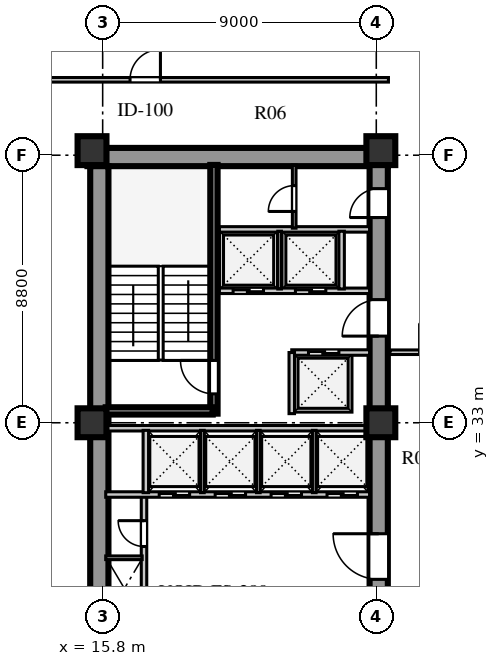
"""IFC4 building model, lengths in metres.
Left out: names, types, materials, properties, quantities, classifications, styles, units other than length and angle.
Written with IfcOpenShell. Run it as: python <this file> out.ifc"""

import sys

from ifc_helpers import new_model, si_unit, direction, frame, frame_2d, origin, origin_2d, place, context, subcontext, project, spatial, rectangle, extrude, element, fill, save


model = new_model("IFC4")
c1 = context("Model", 3, precision=1e-05, world=origin(), true_north=direction((0.0, 1.0)))
c2 = subcontext(c1, "Body", "Model", "MODEL_VIEW")
j1 = project(units=[si_unit("LENGTHUNIT", "METRE"), si_unit("PLANEANGLEUNIT", "RADIAN")], contexts=[c1])
p1 = place(None, origin())
s1 = spatial("IfcSite", under=j1, at=p1, CompositionType="ELEMENT")
p2 = place(p1, origin())
s2 = spatial("IfcBuilding", under=s1, at=p2, CompositionType="ELEMENT")
p3 = place(p2, frame((0.0, 0.0, 58.0)))
s3 = spatial("IfcBuildingStorey", under=s2, at=p3, CompositionType="ELEMENT", Elevation=58.0)
p4 = place(p3, frame((15.3, 41.74, 0.0), z_axis=(0.0, 0.0, 1.0), x_axis=(1.0, 0.0, 0.0)))
e1 = element("IfcWall", 1, at=p4, inside=s3, PredefinedType="SHEAR", context=c2, shape_type="SweptSolid", body=[
    extrude(rectangle(XDim=9.88, YDim=0.6, at=frame_2d((4.94, 0.0))), origin(), (0.0, 0.0, 1.0), 3.72),
])
p5 = place(p3, frame((15.69, 15.81, 0.0), z_axis=(0.0, 0.0, 1.0), x_axis=(0.0, 1.0, 0.0)))
e2 = element("IfcWall", 2, at=p5, inside=s3, PredefinedType="SHEAR", context=c2, shape_type="SweptSolid", body=[
    extrude(rectangle(XDim=25.63, YDim=0.6, at=frame_2d((12.815, 0.0))), origin(), (0.0, 0.0, 1.0), 3.72),
])
p6 = place(p3, frame((24.88, 15.74, 0.0), z_axis=(0.0, 0.0, 1.0), x_axis=(0.0, 1.0, 0.0)))
e3 = element("IfcWall", 3, at=p6, inside=s3, PredefinedType="SHEAR", context=c2, shape_type="SweptSolid", body=[
    extrude(rectangle(XDim=25.76, YDim=0.6, at=frame_2d((12.88, 0.0))), origin(), (0.0, 0.0, 1.0), 3.72),
])
p7 = place(p6, frame((1.61, 0.0, 0.0)))
e4 = element("IfcOpeningElement", 4, at=p7, cuts=e3, PredefinedType="OPENING", context=c2, shape_type="SweptSolid", body=[
    extrude(rectangle(XDim=1.2, YDim=2.1, at=frame_2d((0.6, 1.05))), frame((0.0, 0.31, 0.0), z_axis=(0.0, -1.0, 0.0), x_axis=(1.0, 0.0, 0.0)), (0.0, 0.0, 1.0), 0.62),
])
p8 = place(p6, frame((6.78, 0.0, 0.0)))
e5 = element("IfcOpeningElement", 5, at=p8, cuts=e3, PredefinedType="OPENING", context=c2, shape_type="SweptSolid", body=[
    extrude(rectangle(XDim=0.85, YDim=2.06, at=frame_2d((0.425, 1.03))), frame((0.0, 0.31, 0.0), z_axis=(0.0, -1.0, 0.0), x_axis=(1.0, 0.0, 0.0)), (0.0, 0.0, 1.0), 0.62),
])
p9 = place(p6, frame((12.11, 0.0, 0.0)))
e6 = element("IfcOpeningElement", 6, at=p9, cuts=e3, PredefinedType="OPENING", context=c2, shape_type="SweptSolid", body=[
    extrude(rectangle(XDim=1.5, YDim=2.12, at=frame_2d((0.75, 1.06))), frame((0.0, 0.31, 0.0), z_axis=(0.0, -1.0, 0.0), x_axis=(1.0, 0.0, 0.0)), (0.0, 0.0, 1.0), 0.62),
])
p10 = place(p6, frame((20.11, 0.0, 0.0)))
e7 = element("IfcOpeningElement", 7, at=p10, cuts=e3, PredefinedType="OPENING", context=c2, shape_type="SweptSolid", body=[
    extrude(rectangle(XDim=1.2, YDim=2.12, at=frame_2d((0.6, 1.06))), frame((0.0, 0.31, 0.0), z_axis=(0.0, -1.0, 0.0), x_axis=(1.0, 0.0, 0.0)), (0.0, 0.0, 1.0), 0.62),
])
p11 = place(p6, frame((24.01, 0.0, 0.0)))
e8 = element("IfcOpeningElement", 8, at=p11, cuts=e3, PredefinedType="OPENING", context=c2, shape_type="SweptSolid", body=[
    extrude(rectangle(XDim=0.95, YDim=2.1, at=frame_2d((0.475, 1.05))), frame((0.0, 0.31, 0.0), z_axis=(0.0, -1.0, 0.0), x_axis=(1.0, 0.0, 0.0)), (0.0, 0.0, 1.0), 0.62),
])
for number, where, z_axis, x_axis in (
    (9, (15.45, 33.0, 0.0), (0.0, 0.0, 1.0), (1.0, 0.0, 0.0)),
    (10, (15.45, 41.95, 0.0), (0.0, 0.0, 1.0), (1.0, 0.0, 0.0)),
    (11, (24.95, 33.0, 0.0), (0.0, 0.0, 1.0), (1.0, 0.0, 0.0)),
    (12, (24.95, 41.95, 0.0), (0.0, 0.0, 1.0), (1.0, 0.0, 0.0)),
):
    element("IfcColumn", number, at=place(p3, frame(where, z_axis=z_axis, x_axis=x_axis)), inside=s3, PredefinedType="COLUMN", context=c2, shape_type="SweptSolid", body=[
        extrude(rectangle(XDim=0.95, YDim=0.95, at=origin_2d()), origin(), (0.0, 0.0, 1.0), 3.72),
    ])
p12 = place(p3, frame((17.16, 26.58, 0.0), z_axis=(0.0, 0.0, 1.0), x_axis=(0.0, 1.0, 0.0)))
e13 = element("IfcWall", 13, at=p12, inside=s3, PredefinedType="SOLIDWALL", context=c2, shape_type="SweptSolid", body=[
    extrude(rectangle(XDim=4.02, YDim=0.18, at=frame_2d((2.01, 0.0))), origin(), (0.0, 0.0, 1.0), 3.72),
])
p13 = place(p12, frame((2.35, 0.0, 0.0)))
e14 = element("IfcOpeningElement", 14, at=p13, cuts=e13, PredefinedType="OPENING", context=c2, shape_type="SweptSolid", body=[
    extrude(rectangle(XDim=0.85, YDim=2.06, at=frame_2d((0.425, 1.03))), frame((0.0, 0.1, 0.0), z_axis=(0.0, -1.0, 0.0), x_axis=(1.0, 0.0, 0.0)), (0.0, 0.0, 1.0), 0.2),
])
p14 = place(p3, frame((15.9, 28.56, 0.0), z_axis=(0.0, 0.0, 1.0), x_axis=(1.0, 0.0, 0.0)))
e15 = element("IfcWall", 15, at=p14, inside=s3, PredefinedType="PARTITIONING", context=c2, shape_type="SweptSolid", body=[
    extrude(rectangle(XDim=1.2, YDim=0.12, at=frame_2d((0.6, 0.0))), origin(), (0.0, 0.0, 1.0), 3.72),
])
p15 = place(p3, frame((15.9, 30.64, 0.0), z_axis=(0.0, 0.0, 1.0), x_axis=(1.0, 0.0, 0.0)))
e16 = element("IfcWall", 16, at=p15, inside=s3, PredefinedType="SOLIDWALL", context=c2, shape_type="SweptSolid", body=[
    extrude(rectangle(XDim=8.68, YDim=0.18, at=frame_2d((4.34, 0.0))), origin(), (0.0, 0.0, 1.0), 3.72),
])
p16 = place(p15, frame((1.76, 0.0, 0.0)))
e17 = element("IfcOpeningElement", 17, at=p16, cuts=e16, PredefinedType="OPENING", context=c2, shape_type="SweptSolid", body=[
    extrude(rectangle(XDim=1.0, YDim=2.1, at=frame_2d((0.5, 1.05))), frame((0.0, 0.1, 0.0), z_axis=(0.0, -1.0, 0.0), x_axis=(1.0, 0.0, 0.0)), (0.0, 0.0, 1.0), 0.2),
])
p17 = place(p15, frame((3.6, 0.0, 0.0)))
e18 = element("IfcOpeningElement", 18, at=p17, cuts=e16, PredefinedType="OPENING", context=c2, shape_type="SweptSolid", body=[
    extrude(rectangle(XDim=1.0, YDim=2.1, at=frame_2d((0.5, 1.05))), frame((0.0, 0.1, 0.0), z_axis=(0.0, -1.0, 0.0), x_axis=(1.0, 0.0, 0.0)), (0.0, 0.0, 1.0), 0.2),
])
p18 = place(p15, frame((5.44, 0.0, 0.0)))
e19 = element("IfcOpeningElement", 19, at=p18, cuts=e16, PredefinedType="OPENING", context=c2, shape_type="SweptSolid", body=[
    extrude(rectangle(XDim=1.0, YDim=2.1, at=frame_2d((0.5, 1.05))), frame((0.0, 0.1, 0.0), z_axis=(0.0, -1.0, 0.0), x_axis=(1.0, 0.0, 0.0)), (0.0, 0.0, 1.0), 0.2),
])
p19 = place(p15, frame((7.28, 0.0, 0.0)))
e20 = element("IfcOpeningElement", 20, at=p19, cuts=e16, PredefinedType="OPENING", context=c2, shape_type="SweptSolid", body=[
    extrude(rectangle(XDim=1.0, YDim=2.1, at=frame_2d((0.5, 1.05))), frame((0.0, 0.1, 0.0), z_axis=(0.0, -1.0, 0.0), x_axis=(1.0, 0.0, 0.0)), (0.0, 0.0, 1.0), 0.2),
])
p20 = place(p3, frame((15.9, 32.82, 0.0), z_axis=(0.0, 0.0, 1.0), x_axis=(1.0, 0.0, 0.0)))
e21 = element("IfcWall", 21, at=p20, inside=s3, PredefinedType="SOLIDWALL", context=c2, shape_type="SweptSolid", body=[
    extrude(rectangle(XDim=8.68, YDim=0.18, at=frame_2d((4.34, 0.0))), origin(), (0.0, 0.0, 1.0), 3.02),
])
p21 = place(p3, frame((17.22, 30.7, 0.0), z_axis=(0.0, 0.0, 1.0), x_axis=(0.0, 1.0, 0.0)))
e22 = element("IfcWall", 22, at=p21, inside=s3, PredefinedType="SOLIDWALL", context=c2, shape_type="SweptSolid", body=[
    extrude(rectangle(XDim=2.05, YDim=0.18, at=frame_2d((1.025, 0.0))), origin(), (0.0, 0.0, 1.0), 3.72),
])
for number, where, z_axis, x_axis in (
    (23, (19.08, 30.7, 0.0), (0.0, 0.0, 1.0), (0.0, 1.0, 0.0)),
    (24, (20.92, 30.7, 0.0), (0.0, 0.0, 1.0), (0.0, 1.0, 0.0)),
    (25, (22.76, 30.7, 0.0), (0.0, 0.0, 1.0), (0.0, 1.0, 0.0)),
):
    element("IfcWall", number, at=place(p3, frame(where, z_axis=z_axis, x_axis=x_axis)), inside=s3, PredefinedType="PARTITIONING", context=c2, shape_type="SweptSolid", body=[
        extrude(rectangle(XDim=2.05, YDim=0.12, at=frame_2d((1.025, 0.0))), origin(), (0.0, 0.0, 1.0), 3.72),
    ])
p22 = place(p3, frame((19.46, 33.3, 0.0), z_axis=(0.0, 0.0, 1.0), x_axis=(0.0, 1.0, 0.0)))
e26 = element("IfcWall", 26, at=p22, inside=s3, PredefinedType="SHEAR", context=c2, shape_type="SweptSolid", body=[
    extrude(rectangle(XDim=8.18, YDim=0.24, at=frame_2d((4.09, 0.0))), origin(), (0.0, 0.0, 1.0), 4.0),
])
p23 = place(p22, frame((0.65, 0.0, 0.0)))
e27 = element("IfcOpeningElement", 27, at=p23, cuts=e26, PredefinedType="OPENING", context=c2, shape_type="SweptSolid", body=[
    extrude(rectangle(XDim=1.1, YDim=2.1, at=frame_2d((0.55, 1.05))), frame((0.0, 0.13, 0.0), z_axis=(0.0, -1.0, 0.0), x_axis=(1.0, 0.0, 0.0)), (0.0, 0.0, 1.0), 0.26),
])
p24 = place(p3, frame((15.9, 33.39, 0.0), z_axis=(0.0, 0.0, 1.0), x_axis=(1.0, 0.0, 0.0)))
e28 = element("IfcWall", 28, at=p24, inside=s3, PredefinedType="SHEAR", context=c2, shape_type="SweptSolid", body=[
    extrude(rectangle(XDim=3.52, YDim=0.24, at=frame_2d((1.76, 0.0))), origin(), (0.0, 0.0, 1.0), 4.0),
])
p25 = place(p3, frame((22.02, 35.31, 0.0), z_axis=(0.0, 0.0, 1.0), x_axis=(1.0, 0.0, 0.0)))
e29 = element("IfcWall", 29, at=p25, inside=s3, PredefinedType="SOLIDWALL", context=c2, shape_type="SweptSolid", body=[
    extrude(rectangle(XDim=2.56, YDim=0.18, at=frame_2d((1.28, 0.0))), origin(), (0.0, 0.0, 1.0), 3.72),
])
p26 = place(p25, frame((0.55, 0.0, 0.0)))
e30 = element("IfcOpeningElement", 30, at=p26, cuts=e29, PredefinedType="OPENING", context=c2, shape_type="SweptSolid", body=[
    extrude(rectangle(XDim=1.0, YDim=2.1, at=frame_2d((0.5, 1.05))), frame((0.0, 0.1, 0.0), z_axis=(0.0, -1.0, 0.0), x_axis=(1.0, 0.0, 0.0)), (0.0, 0.0, 1.0), 0.2),
])
p27 = place(p3, frame((22.02, 33.3, 0.0), z_axis=(0.0, 0.0, 1.0), x_axis=(0.0, 1.0, 0.0)))
e31 = element("IfcWall", 31, at=p27, inside=s3, PredefinedType="SOLIDWALL", context=c2, shape_type="SweptSolid", body=[
    extrude(rectangle(XDim=2.01, YDim=0.18, at=frame_2d((1.005, 0.0))), origin(), (0.0, 0.0, 1.0), 3.72),
])
p28 = place(p3, frame((19.64, 37.34, 0.0), z_axis=(0.0, 0.0, 1.0), x_axis=(1.0, 0.0, 0.0)))
e32 = element("IfcWall", 32, at=p28, inside=s3, PredefinedType="SOLIDWALL", context=c2, shape_type="SweptSolid", body=[
    extrude(rectangle(XDim=4.94, YDim=0.18, at=frame_2d((2.47, 0.0))), origin(), (0.0, 0.0, 1.0), 3.72),
])
p29 = place(p28, frame((0.45, 0.0, 0.0)))
e33 = element("IfcOpeningElement", 33, at=p29, cuts=e32, PredefinedType="OPENING", context=c2, shape_type="SweptSolid", body=[
    extrude(rectangle(XDim=1.0, YDim=2.1, at=frame_2d((0.5, 1.05))), frame((0.0, 0.1, 0.0), z_axis=(0.0, -1.0, 0.0), x_axis=(1.0, 0.0, 0.0)), (0.0, 0.0, 1.0), 0.2),
])
p30 = place(p28, frame((2.5, 0.0, 0.0)))
e34 = element("IfcOpeningElement", 34, at=p30, cuts=e32, PredefinedType="OPENING", context=c2, shape_type="SweptSolid", body=[
    extrude(rectangle(XDim=1.0, YDim=2.1, at=frame_2d((0.5, 1.05))), frame((0.0, 0.1, 0.0), z_axis=(0.0, -1.0, 0.0), x_axis=(1.0, 0.0, 0.0)), (0.0, 0.0, 1.0), 0.2),
])
p31 = place(p3, frame((19.64, 39.36, 0.0), z_axis=(0.0, 0.0, 1.0), x_axis=(1.0, 0.0, 0.0)))
e35 = element("IfcWall", 35, at=p31, inside=s3, PredefinedType="SOLIDWALL", context=c2, shape_type="SweptSolid", body=[
    extrude(rectangle(XDim=4.94, YDim=0.18, at=frame_2d((2.47, 0.0))), origin(), (0.0, 0.0, 1.0), 3.72),
])
p32 = place(p3, frame((21.62, 37.4, 0.0), z_axis=(0.0, 0.0, 1.0), x_axis=(0.0, 1.0, 0.0)))
e36 = element("IfcWall", 36, at=p32, inside=s3, PredefinedType="PARTITIONING", context=c2, shape_type="SweptSolid", body=[
    extrude(rectangle(XDim=1.9, YDim=0.12, at=frame_2d((0.95, 0.0))), origin(), (0.0, 0.0, 1.0), 3.72),
])
p33 = place(p3, frame((23.66, 37.4, 0.0), z_axis=(0.0, 0.0, 1.0), x_axis=(0.0, 1.0, 0.0)))
e37 = element("IfcWall", 37, at=p33, inside=s3, PredefinedType="SOLIDWALL", context=c2, shape_type="SweptSolid", body=[
    extrude(rectangle(XDim=1.9, YDim=0.18, at=frame_2d((0.95, 0.0))), origin(), (0.0, 0.0, 1.0), 3.72),
])
p34 = place(p3, frame((22.1, 39.4, 0.0), z_axis=(0.0, 0.0, 1.0), x_axis=(0.0, 1.0, 0.0)))
e38 = element("IfcWall", 38, at=p34, inside=s3, PredefinedType="PARTITIONING", context=c2, shape_type="SweptSolid", body=[
    extrude(rectangle(XDim=2.08, YDim=0.12, at=frame_2d((1.04, 0.0))), origin(), (0.0, 0.0, 1.0), 3.72),
])
p35 = place(p34, frame((0.55, 0.0, 0.0)))
e39 = element("IfcOpeningElement", 39, at=p35, cuts=e38, PredefinedType="OPENING", context=c2, shape_type="SweptSolid", body=[
    extrude(rectangle(XDim=0.85, YDim=2.06, at=frame_2d((0.425, 1.03))), frame((0.0, 0.07, 0.0), z_axis=(0.0, -1.0, 0.0), x_axis=(1.0, 0.0, 0.0)), (0.0, 0.0, 1.0), 0.14),
])
p36 = place(p3, frame((25.25, 35.32, 0.0), z_axis=(0.0, 0.0, 1.0), x_axis=(1.0, 0.0, 0.0)))
e40 = element("IfcWall", 40, at=p36, inside=s3, PredefinedType="PARTITIONING", context=c2, shape_type="SweptSolid", body=[
    extrude(rectangle(XDim=9.47, YDim=0.15, at=frame_2d((4.735, 0.0))), origin(), (0.0, 0.0, 1.0), 3.72),
])
p37 = place(p36, frame((0.975, 0.0, 0.0)))
e41 = element("IfcOpeningElement", 41, at=p37, cuts=e40, PredefinedType="OPENING", context=c2, shape_type="SweptSolid", body=[
    extrude(rectangle(XDim=0.95, YDim=2.08, at=frame_2d((0.475, 1.04))), frame((0.0, 0.085, 0.0), z_axis=(0.0, -1.0, 0.0), x_axis=(1.0, 0.0, 0.0)), (0.0, 0.0, 1.0), 0.17),
])
p38 = place(p36, frame((4.025, 0.0, 0.0)))
e42 = element("IfcOpeningElement", 42, at=p38, cuts=e40, PredefinedType="OPENING", context=c2, shape_type="SweptSolid", body=[
    extrude(rectangle(XDim=0.95, YDim=2.08, at=frame_2d((0.475, 1.04))), frame((0.0, 0.085, 0.0), z_axis=(0.0, -1.0, 0.0), x_axis=(1.0, 0.0, 0.0)), (0.0, 0.0, 1.0), 0.17),
])
p39 = place(p36, frame((7.315, 0.0, 0.0)))
e43 = element("IfcOpeningElement", 43, at=p39, cuts=e40, PredefinedType="OPENING", context=c2, shape_type="SweptSolid", body=[
    extrude(rectangle(XDim=0.95, YDim=2.08, at=frame_2d((0.475, 1.04))), frame((0.0, 0.085, 0.0), z_axis=(0.0, -1.0, 0.0), x_axis=(1.0, 0.0, 0.0)), (0.0, 0.0, 1.0), 0.17),
])
p40 = place(p3, frame((10.5, 44.28, 0.0), z_axis=(0.0, 0.0, 1.0), x_axis=(1.0, 0.0, 0.0)))
e44 = element("IfcWall", 44, at=p40, inside=s3, PredefinedType="PARTITIONING", context=c2, shape_type="SweptSolid", body=[
    extrude(rectangle(XDim=14.7, YDim=0.15, at=frame_2d((7.35, 0.0))), origin(), (0.0, 0.0, 1.0), 3.72),
])
p41 = place(p40, frame((6.2, 0.0, 0.0)))
e45 = element("IfcOpeningElement", 45, at=p41, cuts=e44, PredefinedType="OPENING", context=c2, shape_type="SweptSolid", body=[
    extrude(rectangle(XDim=1.0, YDim=2.08, at=frame_2d((0.5, 1.04))), frame((0.0, 0.085, 0.0), z_axis=(0.0, -1.0, 0.0), x_axis=(1.0, 0.0, 0.0)), (0.0, 0.0, 1.0), 0.17),
])
p42 = place(p13, origin())
e46 = element("IfcDoor", 46, at=p42, inside=s3, OperationType="SINGLE_SWING_RIGHT", PredefinedType="DOOR", context=c2, shape_type="SweptSolid", body=[
    extrude(rectangle(XDim=0.85, YDim=2.06, at=frame_2d((0.425, 1.03))), frame((0.0, 0.025, 0.0), z_axis=(0.0, -1.0, 0.0), x_axis=(1.0, 0.0, 0.0)), (0.0, 0.0, 1.0), 0.05),
])
fill(e14, e46)
p43 = place(p9, frame((1.5, 0.0, 0.0), z_axis=(0.0, 0.0, 1.0), x_axis=(-1.0, 0.0, 0.0)))
e47 = element("IfcDoor", 47, at=p43, inside=s3, OperationType="SINGLE_SWING_LEFT", PredefinedType="DOOR", context=c2, shape_type="SweptSolid", body=[
    extrude(rectangle(XDim=1.5, YDim=2.12, at=frame_2d((0.75, 1.06))), frame((0.0, 0.025, 0.0), z_axis=(0.0, -1.0, 0.0), x_axis=(1.0, 0.0, 0.0)), (0.0, 0.0, 1.0), 0.05),
])
fill(e6, e47)
p44 = place(p16, frame((1.0, 0.0, 0.0), z_axis=(0.0, 0.0, 1.0), x_axis=(-1.0, 0.0, 0.0)))
e48 = element("IfcDoor", 48, at=p44, inside=s3, OperationType="DOUBLE_DOOR_SLIDING", PredefinedType="DOOR", context=c2, shape_type="SweptSolid", body=[
    extrude(rectangle(XDim=1.0, YDim=2.1, at=frame_2d((0.5, 1.05))), frame((0.0, 0.025, 0.0), z_axis=(0.0, -1.0, 0.0), x_axis=(1.0, 0.0, 0.0)), (0.0, 0.0, 1.0), 0.05),
])
fill(e17, e48)
p45 = place(p17, frame((1.0, 0.0, 0.0), z_axis=(0.0, 0.0, 1.0), x_axis=(-1.0, 0.0, 0.0)))
e49 = element("IfcDoor", 49, at=p45, inside=s3, OperationType="DOUBLE_DOOR_SLIDING", PredefinedType="DOOR", context=c2, shape_type="SweptSolid", body=[
    extrude(rectangle(XDim=1.0, YDim=2.1, at=frame_2d((0.5, 1.05))), frame((0.0, 0.025, 0.0), z_axis=(0.0, -1.0, 0.0), x_axis=(1.0, 0.0, 0.0)), (0.0, 0.0, 1.0), 0.05),
])
fill(e18, e49)
p46 = place(p18, frame((1.0, 0.0, 0.0), z_axis=(0.0, 0.0, 1.0), x_axis=(-1.0, 0.0, 0.0)))
e50 = element("IfcDoor", 50, at=p46, inside=s3, OperationType="DOUBLE_DOOR_SLIDING", PredefinedType="DOOR", context=c2, shape_type="SweptSolid", body=[
    extrude(rectangle(XDim=1.0, YDim=2.1, at=frame_2d((0.5, 1.05))), frame((0.0, 0.025, 0.0), z_axis=(0.0, -1.0, 0.0), x_axis=(1.0, 0.0, 0.0)), (0.0, 0.0, 1.0), 0.05),
])
fill(e19, e50)
p47 = place(p19, frame((1.0, 0.0, 0.0), z_axis=(0.0, 0.0, 1.0), x_axis=(-1.0, 0.0, 0.0)))
e51 = element("IfcDoor", 51, at=p47, inside=s3, OperationType="DOUBLE_DOOR_SLIDING", PredefinedType="DOOR", context=c2, shape_type="SweptSolid", body=[
    extrude(rectangle(XDim=1.0, YDim=2.1, at=frame_2d((0.5, 1.05))), frame((0.0, 0.025, 0.0), z_axis=(0.0, -1.0, 0.0), x_axis=(1.0, 0.0, 0.0)), (0.0, 0.0, 1.0), 0.05),
])
fill(e20, e51)
p48 = place(p23, origin())
e52 = element("IfcDoor", 52, at=p48, inside=s3, OperationType="SINGLE_SWING_RIGHT", PredefinedType="DOOR", context=c2, shape_type="SweptSolid", body=[
    extrude(rectangle(XDim=1.1, YDim=2.1, at=frame_2d((0.55, 1.05))), frame((0.0, 0.025, 0.0), z_axis=(0.0, -1.0, 0.0), x_axis=(1.0, 0.0, 0.0)), (0.0, 0.0, 1.0), 0.05),
])
fill(e27, e52)
p49 = place(p10, frame((1.2, 0.0, 0.0), z_axis=(0.0, 0.0, 1.0), x_axis=(-1.0, 0.0, 0.0)))
e53 = element("IfcDoor", 53, at=p49, inside=s3, OperationType="SINGLE_SWING_RIGHT", PredefinedType="DOOR", context=c2, shape_type="SweptSolid", body=[
    extrude(rectangle(XDim=1.2, YDim=2.12, at=frame_2d((0.6, 1.06))), frame((0.0, 0.025, 0.0), z_axis=(0.0, -1.0, 0.0), x_axis=(1.0, 0.0, 0.0)), (0.0, 0.0, 1.0), 0.05),
])
fill(e7, e53)
p50 = place(p29, frame((1.0, 0.0, 0.0), z_axis=(0.0, 0.0, 1.0), x_axis=(-1.0, 0.0, 0.0)))
e54 = element("IfcDoor", 54, at=p50, inside=s3, OperationType="DOUBLE_DOOR_SLIDING", PredefinedType="DOOR", context=c2, shape_type="SweptSolid", body=[
    extrude(rectangle(XDim=1.0, YDim=2.1, at=frame_2d((0.5, 1.05))), frame((0.0, 0.025, 0.0), z_axis=(0.0, -1.0, 0.0), x_axis=(1.0, 0.0, 0.0)), (0.0, 0.0, 1.0), 0.05),
])
fill(e33, e54)
p51 = place(p30, frame((1.0, 0.0, 0.0), z_axis=(0.0, 0.0, 1.0), x_axis=(-1.0, 0.0, 0.0)))
e55 = element("IfcDoor", 55, at=p51, inside=s3, OperationType="DOUBLE_DOOR_SLIDING", PredefinedType="DOOR", context=c2, shape_type="SweptSolid", body=[
    extrude(rectangle(XDim=1.0, YDim=2.1, at=frame_2d((0.5, 1.05))), frame((0.0, 0.025, 0.0), z_axis=(0.0, -1.0, 0.0), x_axis=(1.0, 0.0, 0.0)), (0.0, 0.0, 1.0), 0.05),
])
fill(e34, e55)
p52 = place(p26, origin())
e56 = element("IfcDoor", 56, at=p52, inside=s3, OperationType="DOUBLE_DOOR_SLIDING", PredefinedType="DOOR", context=c2, shape_type="SweptSolid", body=[
    extrude(rectangle(XDim=1.0, YDim=2.1, at=frame_2d((0.5, 1.05))), frame((0.0, 0.025, 0.0), z_axis=(0.0, -1.0, 0.0), x_axis=(1.0, 0.0, 0.0)), (0.0, 0.0, 1.0), 0.05),
])
fill(e30, e56)
p53 = place(p35, origin())
e57 = element("IfcDoor", 57, at=p53, inside=s3, OperationType="SINGLE_SWING_LEFT", PredefinedType="DOOR", context=c2, shape_type="SweptSolid", body=[
    extrude(rectangle(XDim=0.85, YDim=2.06, at=frame_2d((0.425, 1.03))), frame((0.0, 0.025, 0.0), z_axis=(0.0, -1.0, 0.0), x_axis=(1.0, 0.0, 0.0)), (0.0, 0.0, 1.0), 0.05),
])
fill(e39, e57)
p54 = place(p11, frame((0.95, 0.0, 0.0), z_axis=(0.0, 0.0, 1.0), x_axis=(-1.0, 0.0, 0.0)))
e58 = element("IfcDoor", 58, at=p54, inside=s3, OperationType="SINGLE_SWING_RIGHT", PredefinedType="DOOR", context=c2, shape_type="SweptSolid", body=[
    extrude(rectangle(XDim=0.95, YDim=2.1, at=frame_2d((0.475, 1.05))), frame((0.0, 0.025, 0.0), z_axis=(0.0, -1.0, 0.0), x_axis=(1.0, 0.0, 0.0)), (0.0, 0.0, 1.0), 0.05),
])
fill(e8, e58)
p55 = place(p41, origin())
e59 = element("IfcDoor", 59, at=p55, inside=s3, OperationType="SINGLE_SWING_RIGHT", PredefinedType="DOOR", context=c2, shape_type="SweptSolid", body=[
    extrude(rectangle(XDim=1.0, YDim=2.08, at=frame_2d((0.5, 1.04))), frame((0.0, 0.025, 0.0), z_axis=(0.0, -1.0, 0.0), x_axis=(1.0, 0.0, 0.0)), (0.0, 0.0, 1.0), 0.05),
])
fill(e45, e59)
save(model, sys.argv[1])
